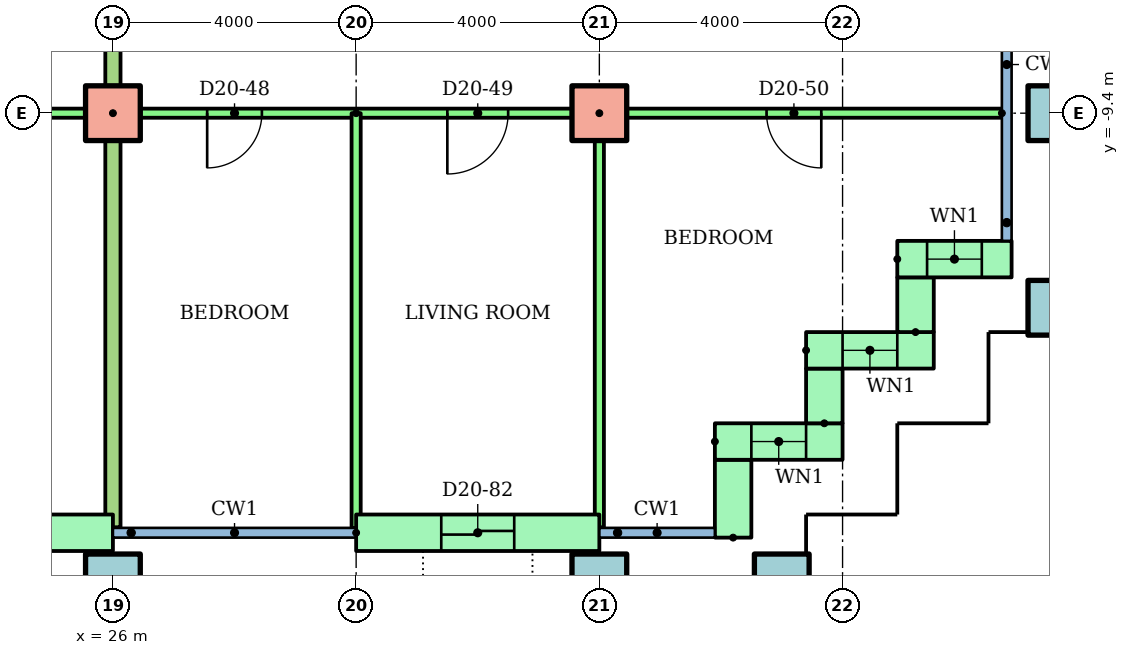
"""IFC4 building model, lengths in metres.
Left out: names, types, materials, properties, quantities, classifications, styles, units other than length and angle.
Written with IfcOpenShell. Run it as: python <this file> out.ifc"""

import sys

from ifc_helpers import new_model, si_unit, direction, frame, frame_2d, origin, origin_2d, place, context, subcontext, project, spatial, rectangle, hollow_rectangle, extrude, element, fill, save


model = new_model("IFC4")
c1 = context("Model", 3, precision=1e-05, world=origin(), true_north=direction((0.0, 1.0)))
c2 = subcontext(c1, "Body", "Model", "MODEL_VIEW")
j1 = project(units=[si_unit("LENGTHUNIT", "METRE"), si_unit("PLANEANGLEUNIT", "RADIAN")], contexts=[c1])
p1 = place(None, origin())
s1 = spatial("IfcSite", under=j1, at=p1, CompositionType="ELEMENT")
p2 = place(p1, origin())
s2 = spatial("IfcBuilding", under=s1, at=p2, CompositionType="ELEMENT")
p3 = place(p2, frame((0.0, 0.0, 80.7)))
s3 = spatial("IfcBuildingStorey", under=s2, at=p3, CompositionType="ELEMENT", Elevation=80.7)
for number, where in (
    (1, (26.0, -17.1, 0.0)),
    (2, (34.0, -17.1, 0.0)),
    (3, (37.0, -17.1, 0.0)),
    (4, (41.5, -12.6, 0.0)),
):
    element("IfcColumn", number, at=place(p3, frame(where)), inside=s3, PredefinedType="COLUMN", context=c2, shape_type="SweptSolid", body=[
        extrude(hollow_rectangle(XDim=0.9, YDim=0.9, WallThickness=0.045, at=origin_2d()), origin(), (0.0, 0.0, 1.0), 3.2),
    ])
for number, where in (
    (5, (26.0, -9.4, 0.0)),
    (6, (34.0, -9.4, 0.0)),
):
    element("IfcColumn", number, at=place(p3, frame(where)), inside=s3, PredefinedType="COLUMN", context=c2, shape_type="SweptSolid", body=[
        extrude(rectangle(XDim=0.9, YDim=0.9, at=origin_2d()), origin(), (0.0, 0.0, 1.0), 3.2),
    ])
p4 = place(p3, frame((41.5, -9.4, 0.0)))
e7 = element("IfcColumn", 7, at=p4, inside=s3, PredefinedType="COLUMN", context=c2, shape_type="SweptSolid", body=[
    extrude(hollow_rectangle(XDim=0.9, YDim=0.9, WallThickness=0.045, at=origin_2d()), origin(), (0.0, 0.0, 1.0), 3.2),
])
p5 = place(p3, frame((22.0, -16.3, 0.0)))
e8 = element("IfcWall", 8, at=p5, inside=s3, PredefinedType="STANDARD", context=c2, shape_type="SweptSolid", body=[
    extrude(rectangle(XDim=4.0, YDim=0.6, at=frame_2d((2.0, 0.0))), origin(), (0.0, 0.0, 1.0), 2.92),
])
p6 = place(p5, frame((1.4, 0.0, 0.0)))
e9 = element("IfcOpeningElement", 9, at=p6, cuts=e8, PredefinedType="OPENING", context=c2, shape_type="SweptSolid", body=[
    extrude(rectangle(XDim=1.2, YDim=2.1, at=frame_2d((0.6, 1.05))), frame((0.0, 0.31, 0.0), z_axis=(0.0, -1.0, 0.0), x_axis=(1.0, 0.0, 0.0)), (0.0, 0.0, 1.0), 0.62),
])
p7 = place(p3, frame((30.0, -16.3, 0.0)))
e10 = element("IfcWall", 10, at=p7, inside=s3, PredefinedType="STANDARD", context=c2, shape_type="SweptSolid", body=[
    extrude(rectangle(XDim=4.0, YDim=0.6, at=frame_2d((2.0, 0.0))), origin(), (0.0, 0.0, 1.0), 2.92),
])
p8 = place(p7, frame((1.4, 0.0, 0.0)))
e11 = element("IfcOpeningElement", 11, at=p8, cuts=e10, PredefinedType="OPENING", context=c2, shape_type="SweptSolid", body=[
    extrude(rectangle(XDim=1.2, YDim=2.1, at=frame_2d((0.6, 1.05))), frame((0.0, 0.31, 0.0), z_axis=(0.0, -1.0, 0.0), x_axis=(1.0, 0.0, 0.0)), (0.0, 0.0, 1.0), 0.62),
])
p9 = place(p3, frame((36.2, -16.38, 0.0), z_axis=(0.0, 0.0, 1.0), x_axis=(0.0, 1.0, 0.0)))
e12 = element("IfcWall", 12, at=p9, inside=s3, PredefinedType="STANDARD", context=c2, shape_type="SweptSolid", body=[
    extrude(rectangle(XDim=1.28, YDim=0.6, at=frame_2d((0.64, 0.0))), origin(), (0.0, 0.0, 1.0), 2.92),
])
p10 = place(p3, frame((35.9, -14.8, 0.0)))
e13 = element("IfcWall", 13, at=p10, inside=s3, PredefinedType="STANDARD", context=c2, shape_type="SweptSolid", body=[
    extrude(rectangle(XDim=2.1, YDim=0.6, at=frame_2d((1.05, 0.0))), origin(), (0.0, 0.0, 1.0), 2.92),
])
p11 = place(p10, frame((0.6, 0.0, 0.9)))
e14 = element("IfcOpeningElement", 14, at=p11, cuts=e13, PredefinedType="OPENING", context=c2, shape_type="SweptSolid", body=[
    extrude(rectangle(XDim=0.9, YDim=1.5, at=frame_2d((0.45, 0.75))), frame((0.0, 0.31, 0.0), z_axis=(0.0, -1.0, 0.0), x_axis=(1.0, 0.0, 0.0)), (0.0, 0.0, 1.0), 0.62),
])
p12 = place(p3, frame((37.7, -14.5, 0.0), z_axis=(0.0, 0.0, 1.0), x_axis=(0.0, 1.0, 0.0)))
e15 = element("IfcWall", 15, at=p12, inside=s3, PredefinedType="STANDARD", context=c2, shape_type="SweptSolid", body=[
    extrude(rectangle(XDim=0.9, YDim=0.6, at=frame_2d((0.45, 0.0))), origin(), (0.0, 0.0, 1.0), 2.92),
])
p13 = place(p3, frame((37.4, -13.3, 0.0)))
e16 = element("IfcWall", 16, at=p13, inside=s3, PredefinedType="STANDARD", context=c2, shape_type="SweptSolid", body=[
    extrude(rectangle(XDim=2.1, YDim=0.6, at=frame_2d((1.05, 0.0))), origin(), (0.0, 0.0, 1.0), 2.92),
])
p14 = place(p13, frame((0.6, 0.0, 0.9)))
e17 = element("IfcOpeningElement", 17, at=p14, cuts=e16, PredefinedType="OPENING", context=c2, shape_type="SweptSolid", body=[
    extrude(rectangle(XDim=0.9, YDim=1.5, at=frame_2d((0.45, 0.75))), frame((0.0, 0.31, 0.0), z_axis=(0.0, -1.0, 0.0), x_axis=(1.0, 0.0, 0.0)), (0.0, 0.0, 1.0), 0.62),
])
p15 = place(p3, frame((39.2, -13.0, 0.0), z_axis=(0.0, 0.0, 1.0), x_axis=(0.0, 1.0, 0.0)))
e18 = element("IfcWall", 18, at=p15, inside=s3, PredefinedType="STANDARD", context=c2, shape_type="SweptSolid", body=[
    extrude(rectangle(XDim=0.9, YDim=0.6, at=frame_2d((0.45, 0.0))), origin(), (0.0, 0.0, 1.0), 2.92),
])
p16 = place(p3, frame((38.9, -11.8, 0.0)))
e19 = element("IfcWall", 19, at=p16, inside=s3, PredefinedType="STANDARD", context=c2, shape_type="SweptSolid", body=[
    extrude(rectangle(XDim=1.88, YDim=0.6, at=frame_2d((0.94, 0.0))), origin(), (0.0, 0.0, 1.0), 2.92),
])
p17 = place(p16, frame((0.49, 0.0, 0.9)))
e20 = element("IfcOpeningElement", 20, at=p17, cuts=e19, PredefinedType="OPENING", context=c2, shape_type="SweptSolid", body=[
    extrude(rectangle(XDim=0.9, YDim=1.5, at=frame_2d((0.45, 0.75))), frame((0.0, 0.31, 0.0), z_axis=(0.0, -1.0, 0.0), x_axis=(1.0, 0.0, 0.0)), (0.0, 0.0, 1.0), 0.62),
])
p18 = place(p3, frame((26.0, -9.4, 0.0), z_axis=(0.0, 0.0, 1.0), x_axis=(-1.0, 0.0, 0.0)))
e21 = element("IfcWall", 21, at=p18, inside=s3, PredefinedType="PARTITIONING", context=c2, shape_type="SweptSolid", body=[
    extrude(rectangle(XDim=16.0, YDim=0.15, at=frame_2d((8.0, 0.0))), origin(), (0.0, 0.0, 1.0), 2.4),
])
p19 = place(p18, frame((13.55, 0.0, 0.0)))
e22 = element("IfcOpeningElement", 22, at=p19, cuts=e21, PredefinedType="OPENING", context=c2, shape_type="SweptSolid", body=[
    extrude(rectangle(XDim=0.9, YDim=2.1, at=frame_2d((0.45, 1.05))), frame((0.0, 0.085, 0.0), z_axis=(0.0, -1.0, 0.0), x_axis=(1.0, 0.0, 0.0)), (0.0, 0.0, 1.0), 0.17),
])
p20 = place(p18, frame((9.55, 0.0, 0.0)))
e23 = element("IfcOpeningElement", 23, at=p20, cuts=e21, PredefinedType="OPENING", context=c2, shape_type="SweptSolid", body=[
    extrude(rectangle(XDim=0.9, YDim=2.1, at=frame_2d((0.45, 1.05))), frame((0.0, 0.085, 0.0), z_axis=(0.0, -1.0, 0.0), x_axis=(1.0, 0.0, 0.0)), (0.0, 0.0, 1.0), 0.17),
])
p21 = place(p18, frame((3.5, 0.0, 0.0)))
e24 = element("IfcOpeningElement", 24, at=p21, cuts=e21, PredefinedType="OPENING", context=c2, shape_type="SweptSolid", body=[
    extrude(rectangle(XDim=1.0, YDim=2.1, at=frame_2d((0.5, 1.05))), frame((0.0, 0.085, 0.0), z_axis=(0.0, -1.0, 0.0), x_axis=(1.0, 0.0, 0.0)), (0.0, 0.0, 1.0), 0.17),
])
p22 = place(p3, frame((40.62, -9.4, 0.0), z_axis=(0.0, 0.0, 1.0), x_axis=(-1.0, 0.0, 0.0)))
e25 = element("IfcWall", 25, at=p22, inside=s3, PredefinedType="PARTITIONING", context=c2, shape_type="SweptSolid", body=[
    extrude(rectangle(XDim=14.62, YDim=0.15, at=frame_2d((7.31, 0.0))), origin(), (0.0, 0.0, 1.0), 2.4),
])
p23 = place(p22, frame((12.17, 0.0, 0.0)))
e26 = element("IfcOpeningElement", 26, at=p23, cuts=e25, PredefinedType="OPENING", context=c2, shape_type="SweptSolid", body=[
    extrude(rectangle(XDim=0.9, YDim=2.1, at=frame_2d((0.45, 1.05))), frame((0.0, 0.085, 0.0), z_axis=(0.0, -1.0, 0.0), x_axis=(1.0, 0.0, 0.0)), (0.0, 0.0, 1.0), 0.17),
])
p24 = place(p22, frame((8.12, 0.0, 0.0)))
e27 = element("IfcOpeningElement", 27, at=p24, cuts=e25, PredefinedType="OPENING", context=c2, shape_type="SweptSolid", body=[
    extrude(rectangle(XDim=1.0, YDim=2.1, at=frame_2d((0.5, 1.05))), frame((0.0, 0.085, 0.0), z_axis=(0.0, -1.0, 0.0), x_axis=(1.0, 0.0, 0.0)), (0.0, 0.0, 1.0), 0.17),
])
p25 = place(p22, frame((2.97, 0.0, 0.0)))
e28 = element("IfcOpeningElement", 28, at=p25, cuts=e25, PredefinedType="OPENING", context=c2, shape_type="SweptSolid", body=[
    extrude(rectangle(XDim=0.9, YDim=2.1, at=frame_2d((0.45, 1.05))), frame((0.0, 0.085, 0.0), z_axis=(0.0, -1.0, 0.0), x_axis=(1.0, 0.0, 0.0)), (0.0, 0.0, 1.0), 0.17),
])
p26 = place(p3, frame((30.0, -9.4, 0.0), z_axis=(0.0, 0.0, 1.0), x_axis=(0.0, -1.0, 0.0)))
e29 = element("IfcWall", 29, at=p26, inside=s3, PredefinedType="PARTITIONING", context=c2, shape_type="SweptSolid", body=[
    extrude(rectangle(XDim=6.821, YDim=0.15, at=frame_2d((3.411, 0.0))), origin(), (0.0, 0.0, 1.0), 2.4),
])
p27 = place(p3, frame((34.0, -9.4, 0.0), z_axis=(0.0, 0.0, 1.0), x_axis=(0.0, -1.0, 0.0)))
e30 = element("IfcWall", 30, at=p27, inside=s3, PredefinedType="PARTITIONING", context=c2, shape_type="SweptSolid", body=[
    extrude(rectangle(XDim=6.81, YDim=0.15, at=frame_2d((3.405, 0.0))), origin(), (0.0, 0.0, 1.0), 2.4),
])
p28 = place(p3, frame((26.0, -1.4, 0.0), z_axis=(0.0, 0.0, 1.0), x_axis=(0.0, -1.0, 0.0)))
e31 = element("IfcWall", 31, at=p28, inside=s3, PredefinedType="PARTITIONING", context=c2, shape_type="SweptSolid", body=[
    extrude(rectangle(XDim=14.81, YDim=0.25, at=frame_2d((7.405, 0.0))), origin(), (0.0, 0.0, 1.0), 2.4),
])
p29 = place(p11, origin())
e32 = element("IfcWindow", 32, at=p29, inside=s3, PartitioningType="SINGLE_PANEL", PredefinedType="WINDOW", context=c2, shape_type="SweptSolid", body=[
    extrude(rectangle(XDim=0.9, YDim=1.5, at=frame_2d((0.45, 0.75))), frame((0.0, 0.03, 0.0), z_axis=(0.0, -1.0, 0.0), x_axis=(1.0, 0.0, 0.0)), (0.0, 0.0, 1.0), 0.06),
])
fill(e14, e32)
p30 = place(p14, origin())
e33 = element("IfcWindow", 33, at=p30, inside=s3, PartitioningType="SINGLE_PANEL", PredefinedType="WINDOW", context=c2, shape_type="SweptSolid", body=[
    extrude(rectangle(XDim=0.9, YDim=1.5, at=frame_2d((0.45, 0.75))), frame((0.0, 0.03, 0.0), z_axis=(0.0, -1.0, 0.0), x_axis=(1.0, 0.0, 0.0)), (0.0, 0.0, 1.0), 0.06),
])
fill(e17, e33)
p31 = place(p17, origin())
e34 = element("IfcWindow", 34, at=p31, inside=s3, PartitioningType="SINGLE_PANEL", PredefinedType="WINDOW", context=c2, shape_type="SweptSolid", body=[
    extrude(rectangle(XDim=0.9, YDim=1.5, at=frame_2d((0.45, 0.75))), frame((0.0, 0.03, 0.0), z_axis=(0.0, -1.0, 0.0), x_axis=(1.0, 0.0, 0.0)), (0.0, 0.0, 1.0), 0.06),
])
fill(e20, e34)
p32 = place(p23, origin())
e35 = element("IfcDoor", 35, at=p32, inside=s3, OperationType="SINGLE_SWING_RIGHT", PredefinedType="DOOR", context=c2, shape_type="SweptSolid", body=[
    extrude(rectangle(XDim=0.9, YDim=2.1, at=frame_2d((0.45, 1.05))), frame((0.0, 0.025, 0.0), z_axis=(0.0, -1.0, 0.0), x_axis=(1.0, 0.0, 0.0)), (0.0, 0.0, 1.0), 0.05),
])
fill(e26, e35)
p33 = place(p24, origin())
e36 = element("IfcDoor", 36, at=p33, inside=s3, OperationType="SINGLE_SWING_RIGHT", PredefinedType="DOOR", context=c2, shape_type="SweptSolid", body=[
    extrude(rectangle(XDim=1.0, YDim=2.1, at=frame_2d((0.5, 1.05))), frame((0.0, 0.025, 0.0), z_axis=(0.0, -1.0, 0.0), x_axis=(1.0, 0.0, 0.0)), (0.0, 0.0, 1.0), 0.05),
])
fill(e27, e36)
p34 = place(p25, origin())
e37 = element("IfcDoor", 37, at=p34, inside=s3, OperationType="SINGLE_SWING_LEFT", PredefinedType="DOOR", context=c2, shape_type="SweptSolid", body=[
    extrude(rectangle(XDim=0.9, YDim=2.1, at=frame_2d((0.45, 1.05))), frame((0.0, 0.025, 0.0), z_axis=(0.0, -1.0, 0.0), x_axis=(1.0, 0.0, 0.0)), (0.0, 0.0, 1.0), 0.05),
])
fill(e28, e37)
p35 = place(p8, origin())
e38 = element("IfcDoor", 38, at=p35, inside=s3, OperationType="SLIDING_TO_LEFT", PredefinedType="DOOR", context=c2, shape_type="SweptSolid", body=[
    extrude(rectangle(XDim=1.2, YDim=2.1, at=frame_2d((0.6, 1.05))), frame((0.0, 0.025, 0.0), z_axis=(0.0, -1.0, 0.0), x_axis=(1.0, 0.0, 0.0)), (0.0, 0.0, 1.0), 0.05),
])
fill(e11, e38)
save(model, sys.argv[1])
